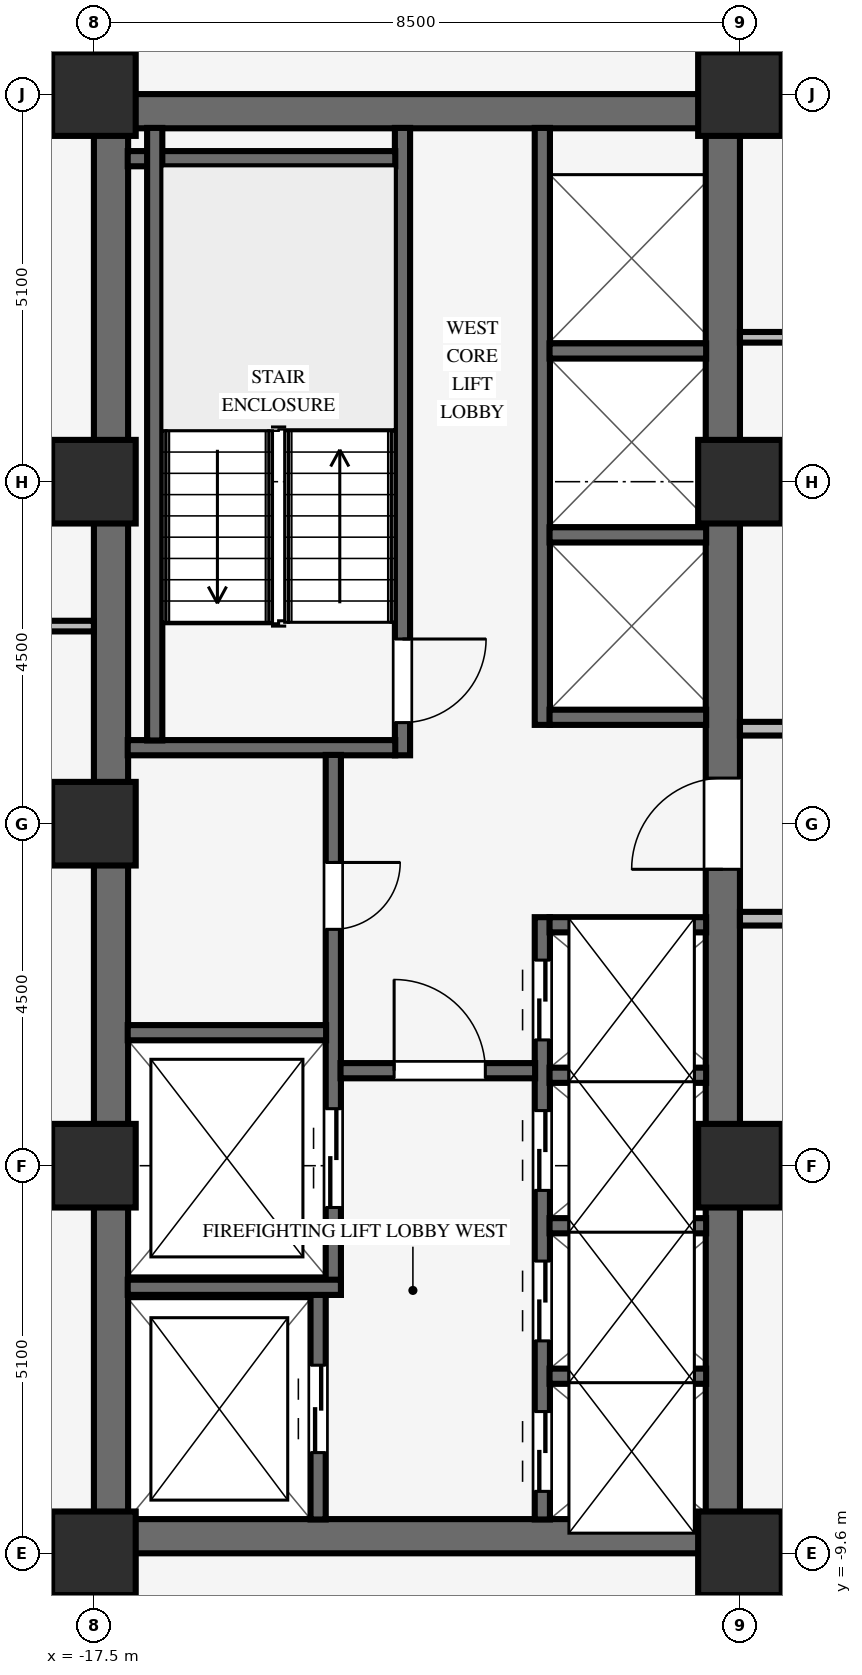
"""IFC4 building model, lengths in metres.
Left out: names, types, materials, properties, quantities, classifications, styles, units other than length and angle.
Written with IfcOpenShell. Run it as: python <this file> out.ifc"""

import sys

from ifc_helpers import new_model, si_unit, direction, frame, frame_2d, origin, origin_2d, place, context, subcontext, project, spatial, rectangle, extrude, source, transform, mapped, element, fill, save


model = new_model("IFC4")
c1 = context("Model", 3, precision=1e-05, world=origin(), true_north=direction((0.0, 1.0)))
c2 = subcontext(c1, "Body", "Model", "MODEL_VIEW")
j1 = project(units=[si_unit("LENGTHUNIT", "METRE"), si_unit("PLANEANGLEUNIT", "RADIAN")], contexts=[c1])
p1 = place(None, origin())
s1 = spatial("IfcSite", under=j1, at=p1, CompositionType="ELEMENT")
p2 = place(p1, origin())
s2 = spatial("IfcBuilding", under=s1, at=p2, CompositionType="ELEMENT")
p3 = place(p2, frame((0.0, 0.0, 60.45)))
s3 = spatial("IfcBuildingStorey", under=s2, at=p3, CompositionType="ELEMENT", Elevation=60.45)
for number, where, z_axis, x_axis in (
    (1, (-17.5, -9.375, 0.0), (0.0, 0.0, 1.0), (1.0, 0.0, 0.0)),
    (2, (-17.5, 9.375, 0.0), (0.0, 0.0, 1.0), (1.0, 0.0, 0.0)),
):
    element("IfcWall", number, at=place(p3, frame(where, z_axis=z_axis, x_axis=x_axis)), inside=s3, PredefinedType="SHEAR", context=c2, shape_type="SweptSolid", body=[
        extrude(rectangle(XDim=8.5, YDim=0.45, at=frame_2d((4.25, 0.0))), origin(), (0.0, 0.0, 1.0), 3.37),
    ])
p4 = place(p3, frame((-17.275, -9.155, 0.0), z_axis=(0.0, 0.0, 1.0), x_axis=(0.0, 1.0, 0.0)))
e3 = element("IfcWall", 3, at=p4, inside=s3, PredefinedType="SHEAR", context=c2, shape_type="SweptSolid", body=[
    extrude(rectangle(XDim=18.31, YDim=0.45, at=frame_2d((9.155, 0.0))), origin(), (0.0, 0.0, 1.0), 3.37),
])
p5 = place(p3, frame((-9.225, -9.155, 0.0), z_axis=(0.0, 0.0, 1.0), x_axis=(0.0, 1.0, 0.0)))
e4 = element("IfcWall", 4, at=p5, inside=s3, PredefinedType="SHEAR", context=c2, shape_type="SweptSolid", body=[
    extrude(rectangle(XDim=18.31, YDim=0.45, at=frame_2d((9.155, 0.0))), origin(), (0.0, 0.0, 1.0), 3.37),
])
p6 = place(p5, frame((8.555, 0.0, 0.0)))
e5 = element("IfcOpeningElement", 5, at=p6, cuts=e4, PredefinedType="OPENING", context=c2, shape_type="SweptSolid", body=[
    extrude(rectangle(XDim=1.2, YDim=2.15, at=frame_2d((0.6, 1.075))), frame((0.0, 0.235, 0.0), z_axis=(0.0, -1.0, 0.0), x_axis=(1.0, 0.0, 0.0)), (0.0, 0.0, 1.0), 0.47),
])
for number, where, z_axis, x_axis in (
    (6, (-17.5, -9.6, 0.0), (0.0, 0.0, 1.0), (1.0, 0.0, 0.0)),
    (7, (-17.5, -4.5, 0.0), (0.0, 0.0, 1.0), (1.0, 0.0, 0.0)),
    (8, (-17.5, 4.5, 0.0), (0.0, 0.0, 1.0), (1.0, 0.0, 0.0)),
    (9, (-17.5, 9.6, 0.0), (0.0, 0.0, 1.0), (1.0, 0.0, 0.0)),
    (10, (-9.0, -9.6, 0.0), (0.0, 0.0, 1.0), (1.0, 0.0, 0.0)),
    (11, (-9.0, -4.5, 0.0), (0.0, 0.0, 1.0), (1.0, 0.0, 0.0)),
    (12, (-9.0, 4.5, 0.0), (0.0, 0.0, 1.0), (1.0, 0.0, 0.0)),
    (13, (-9.0, 9.6, 0.0), (0.0, 0.0, 1.0), (1.0, 0.0, 0.0)),
    (14, (-17.5, 0.0, 0.0), (0.0, 0.0, 1.0), (1.0, 0.0, 0.0)),
):
    element("IfcColumn", number, at=place(p3, frame(where, z_axis=z_axis, x_axis=x_axis)), inside=s3, PredefinedType="COLUMN", context=c2, shape_type="SweptSolid", body=[
        extrude(rectangle(XDim=1.1, YDim=1.1, at=origin_2d()), origin(), (0.0, 0.0, 1.0), 3.37),
    ])
p7 = place(p3, frame((-13.44, 0.9, 0.0), z_axis=(0.0, 0.0, 1.0), x_axis=(0.0, 1.0, 0.0)))
e15 = element("IfcWall", 15, at=p7, inside=s3, PredefinedType="SHEAR", context=c2, shape_type="SweptSolid", body=[
    extrude(rectangle(XDim=8.255, YDim=0.2, at=frame_2d((4.127, 0.0))), origin(), (0.0, 0.0, 1.0), 3.37),
])
p8 = place(p7, frame((1.53, 0.0, 0.0), z_axis=(0.0, 0.0, 1.0), x_axis=(-1.0, 0.0, 0.0)))
e16 = element("IfcOpeningElement", 16, at=p8, cuts=e15, PredefinedType="OPENING", context=c2, shape_type="SweptSolid", body=[
    extrude(rectangle(XDim=1.1, YDim=2.15, at=frame_2d((0.55, 1.075))), frame((0.0, 0.11, 0.0), z_axis=(0.0, -1.0, 0.0), x_axis=(1.0, 0.0, 0.0)), (0.0, 0.0, 1.0), 0.22),
])
for number, where, z_axis, x_axis in (
    (17, (-17.055, 1.0, 0.0), (0.0, 0.0, 1.0), (1.0, 0.0, 0.0)),
    (18, (-17.055, 8.75, 0.0), (0.0, 0.0, 1.0), (1.0, 0.0, 0.0)),
):
    element("IfcWall", number, at=place(p3, frame(where, z_axis=z_axis, x_axis=x_axis)), inside=s3, PredefinedType="SHEAR", context=c2, shape_type="SweptSolid", body=[
        extrude(rectangle(XDim=3.52, YDim=0.2, at=frame_2d((1.76, 0.0))), origin(), (0.0, 0.0, 1.0), 3.37),
    ])
p9 = place(p3, frame((-16.7, 1.095, 0.0), z_axis=(0.0, 0.0, 1.0), x_axis=(0.0, 1.0, 0.0)))
e19 = element("IfcWall", 19, at=p9, inside=s3, PredefinedType="SHEAR", context=c2, shape_type="SweptSolid", body=[
    extrude(rectangle(XDim=8.06, YDim=0.2, at=frame_2d((4.03, 0.0))), origin(), (0.0, 0.0, 1.0), 3.37),
])
p10 = place(p3, frame((-14.55, -9.155, 0.0), z_axis=(0.0, 0.0, 1.0), x_axis=(0.0, 1.0, 0.0)))
e20 = element("IfcWall", 20, at=p10, inside=s3, PredefinedType="SHEAR", context=c2, shape_type="SweptSolid", body=[
    extrude(rectangle(XDim=2.96, YDim=0.2, at=frame_2d((1.48, 0.0))), origin(), (0.0, 0.0, 1.0), 3.37),
])
p11 = place(p10, frame((0.88, 0.0, 0.0)))
e21 = element("IfcOpeningElement", 21, at=p11, cuts=e20, PredefinedType="OPENING", context=c2, shape_type="SweptSolid", body=[
    extrude(rectangle(XDim=1.15, YDim=2.15, at=frame_2d((0.575, 1.075))), frame((0.0, 0.11, 0.0), z_axis=(0.0, -1.0, 0.0), x_axis=(1.0, 0.0, 0.0)), (0.0, 0.0, 1.0), 0.22),
])
p12 = place(p3, frame((-14.35, -6.2, 0.0), z_axis=(0.0, 0.0, 1.0), x_axis=(0.0, 1.0, 0.0)))
e22 = element("IfcWall", 22, at=p12, inside=s3, PredefinedType="SHEAR", context=c2, shape_type="SweptSolid", body=[
    extrude(rectangle(XDim=7.105, YDim=0.2, at=frame_2d((3.552, 0.0))), origin(), (0.0, 0.0, 1.0), 3.37),
])
p13 = place(p12, frame((5.69, 0.0, 0.0), z_axis=(0.0, 0.0, 1.0), x_axis=(-1.0, 0.0, 0.0)))
e23 = element("IfcOpeningElement", 23, at=p13, cuts=e22, PredefinedType="OPENING", context=c2, shape_type="SweptSolid", body=[
    extrude(rectangle(XDim=0.88, YDim=2.1, at=frame_2d((0.44, 1.05))), frame((0.0, 0.11, 0.0), z_axis=(0.0, -1.0, 0.0), x_axis=(1.0, 0.0, 0.0)), (0.0, 0.0, 1.0), 0.22),
])
p14 = place(p12, frame((1.15, 0.0, 0.0)))
e24 = element("IfcOpeningElement", 24, at=p14, cuts=e22, PredefinedType="OPENING", context=c2, shape_type="SweptSolid", body=[
    extrude(rectangle(XDim=1.3, YDim=2.2, at=frame_2d((0.65, 1.1))), frame((0.0, 0.11, 0.0), z_axis=(0.0, -1.0, 0.0), x_axis=(1.0, 0.0, 0.0)), (0.0, 0.0, 1.0), 0.22),
])
p15 = place(p3, frame((-17.055, -6.1, 0.0), z_axis=(0.0, 0.0, 1.0), x_axis=(1.0, 0.0, 0.0)))
e25 = element("IfcWall", 25, at=p15, inside=s3, PredefinedType="SHEAR", context=c2, shape_type="SweptSolid", body=[
    extrude(rectangle(XDim=2.805, YDim=0.2, at=frame_2d((1.402, 0.0))), origin(), (0.0, 0.0, 1.0), 3.37),
])
p16 = place(p3, frame((-17.055, -2.75, 0.0), z_axis=(0.0, 0.0, 1.0), x_axis=(1.0, 0.0, 0.0)))
e26 = element("IfcWall", 26, at=p16, inside=s3, PredefinedType="SHEAR", context=c2, shape_type="SweptSolid", body=[
    extrude(rectangle(XDim=2.61, YDim=0.2, at=frame_2d((1.305, 0.0))), origin(), (0.0, 0.0, 1.0), 3.37),
])
p17 = place(p3, frame((-11.6, -9.155, 0.0), z_axis=(0.0, 0.0, 1.0), x_axis=(0.0, 1.0, 0.0)))
e27 = element("IfcWall", 27, at=p17, inside=s3, PredefinedType="SHEAR", context=c2, shape_type="SweptSolid", body=[
    extrude(rectangle(XDim=7.925, YDim=0.2, at=frame_2d((3.962, 0.0))), origin(), (0.0, 0.0, 1.0), 3.37),
])
p18 = place(p17, frame((0.37, 0.0, 0.0)))
e28 = element("IfcOpeningElement", 28, at=p18, cuts=e27, PredefinedType="OPENING", context=c2, shape_type="SweptSolid", body=[
    extrude(rectangle(XDim=1.05, YDim=2.15, at=frame_2d((0.525, 1.075))), frame((0.0, 0.11, 0.0), z_axis=(0.0, -1.0, 0.0), x_axis=(1.0, 0.0, 0.0)), (0.0, 0.0, 1.0), 0.22),
])
p19 = place(p17, frame((2.35, 0.0, 0.0)))
e29 = element("IfcOpeningElement", 29, at=p19, cuts=e27, PredefinedType="OPENING", context=c2, shape_type="SweptSolid", body=[
    extrude(rectangle(XDim=1.05, YDim=2.15, at=frame_2d((0.525, 1.075))), frame((0.0, 0.11, 0.0), z_axis=(0.0, -1.0, 0.0), x_axis=(1.0, 0.0, 0.0)), (0.0, 0.0, 1.0), 0.22),
])
p20 = place(p17, frame((4.33, 0.0, 0.0)))
e30 = element("IfcOpeningElement", 30, at=p20, cuts=e27, PredefinedType="OPENING", context=c2, shape_type="SweptSolid", body=[
    extrude(rectangle(XDim=1.05, YDim=2.15, at=frame_2d((0.525, 1.075))), frame((0.0, 0.11, 0.0), z_axis=(0.0, -1.0, 0.0), x_axis=(1.0, 0.0, 0.0)), (0.0, 0.0, 1.0), 0.22),
])
p21 = place(p17, frame((6.31, 0.0, 0.0)))
e31 = element("IfcOpeningElement", 31, at=p21, cuts=e27, PredefinedType="OPENING", context=c2, shape_type="SweptSolid", body=[
    extrude(rectangle(XDim=1.05, YDim=2.15, at=frame_2d((0.525, 1.075))), frame((0.0, 0.11, 0.0), z_axis=(0.0, -1.0, 0.0), x_axis=(1.0, 0.0, 0.0)), (0.0, 0.0, 1.0), 0.22),
])
p22 = place(p3, frame((-14.255, -3.25, 0.0), z_axis=(0.0, 0.0, 1.0), x_axis=(1.0, 0.0, 0.0)))
e32 = element("IfcWall", 32, at=p22, inside=s3, PredefinedType="SHEAR", context=c2, shape_type="SweptSolid", body=[
    extrude(rectangle(XDim=2.56, YDim=0.2, at=frame_2d((1.28, 0.0))), origin(), (0.0, 0.0, 1.0), 3.37),
])
p23 = place(p22, frame((0.705, 0.0, 0.0)))
e33 = element("IfcOpeningElement", 33, at=p23, cuts=e32, PredefinedType="OPENING", context=c2, shape_type="SweptSolid", body=[
    extrude(rectangle(XDim=1.2, YDim=2.15, at=frame_2d((0.6, 1.075))), frame((0.0, 0.11, 0.0), z_axis=(0.0, -1.0, 0.0), x_axis=(1.0, 0.0, 0.0)), (0.0, 0.0, 1.0), 0.22),
])
for number, where, z_axis, x_axis in (
    (34, (-11.505, -7.27, 0.0), (0.0, 0.0, 1.0), (1.0, 0.0, 0.0)),
    (35, (-11.505, -5.29, 0.0), (0.0, 0.0, 1.0), (1.0, 0.0, 0.0)),
    (36, (-11.505, -3.31, 0.0), (0.0, 0.0, 1.0), (1.0, 0.0, 0.0)),
    (37, (-11.505, -1.33, 0.0), (0.0, 0.0, 1.0), (1.0, 0.0, 0.0)),
):
    element("IfcWall", number, at=place(p3, frame(where, z_axis=z_axis, x_axis=x_axis)), inside=s3, PredefinedType="SHEAR", context=c2, shape_type="SweptSolid", body=[
        extrude(rectangle(XDim=2.06, YDim=0.2, at=frame_2d((1.03, 0.0))), origin(), (0.0, 0.0, 1.0), 3.37),
    ])
p24 = place(p3, frame((-11.6, 1.3, 0.0), z_axis=(0.0, 0.0, 1.0), x_axis=(0.0, 1.0, 0.0)))
e38 = element("IfcWall", 38, at=p24, inside=s3, PredefinedType="SHEAR", context=c2, shape_type="SweptSolid", body=[
    extrude(rectangle(XDim=7.855, YDim=0.2, at=frame_2d((3.927, 0.0))), origin(), (0.0, 0.0, 1.0), 3.37),
])
for number, where, z_axis, x_axis in (
    (39, (-11.505, 1.4, 0.0), (0.0, 0.0, 1.0), (1.0, 0.0, 0.0)),
    (40, (-11.505, 3.8, 0.0), (0.0, 0.0, 1.0), (1.0, 0.0, 0.0)),
    (41, (-11.505, 6.22, 0.0), (0.0, 0.0, 1.0), (1.0, 0.0, 0.0)),
):
    element("IfcWall", number, at=place(p3, frame(where, z_axis=z_axis, x_axis=x_axis)), inside=s3, PredefinedType="SHEAR", context=c2, shape_type="SweptSolid", body=[
        extrude(rectangle(XDim=2.06, YDim=0.2, at=frame_2d((1.03, 0.0))), origin(), (0.0, 0.0, 1.0), 3.37),
    ])
p25 = place(p3, frame((-8.454, -9.6, 0.0), z_axis=(0.0, 0.0, 1.0), x_axis=(1.0, 0.0, 0.0)))
e42 = element("IfcWall", 42, at=p25, inside=s3, PredefinedType="PARTITIONING", context=c2, shape_type="SweptSolid", body=[
    extrude(rectangle(XDim=5.254, YDim=0.18, at=frame_2d((2.627, 0.0))), origin(), (0.0, 0.0, 1.0), 2.405),
])
p26 = place(p3, frame((-9.0, -1.25, 0.0), z_axis=(0.0, 0.0, 1.0), x_axis=(1.0, 0.0, 0.0)))
e43 = element("IfcWall", 43, at=p26, inside=s3, PredefinedType="PARTITIONING", context=c2, shape_type="SweptSolid", body=[
    extrude(rectangle(XDim=5.8, YDim=0.18, at=frame_2d((2.9, 0.0))), origin(), (0.0, 0.0, 1.0), 3.36),
])
p27 = place(p3, frame((-9.0, 1.25, 0.0), z_axis=(0.0, 0.0, 1.0), x_axis=(1.0, 0.0, 0.0)))
e44 = element("IfcWall", 44, at=p27, inside=s3, PredefinedType="PARTITIONING", context=c2, shape_type="SweptSolid", body=[
    extrude(rectangle(XDim=5.8, YDim=0.18, at=frame_2d((2.9, 0.0))), origin(), (0.0, 0.0, 1.0), 3.36),
])
p28 = place(p27, frame((2.42, 0.0, 0.0)))
e45 = element("IfcOpeningElement", 45, at=p28, cuts=e44, PredefinedType="OPENING", context=c2, shape_type="SweptSolid", body=[
    extrude(rectangle(XDim=0.96, YDim=2.1, at=frame_2d((0.48, 1.05))), frame((0.0, 0.1, 0.0), z_axis=(0.0, -1.0, 0.0), x_axis=(1.0, 0.0, 0.0)), (0.0, 0.0, 1.0), 0.2),
])
p29 = place(p3, frame((-21.16, 2.6, 0.0), z_axis=(0.0, 0.0, 1.0), x_axis=(1.0, 0.0, 0.0)))
e46 = element("IfcWall", 46, at=p29, inside=s3, PredefinedType="PARTITIONING", context=c2, shape_type="SweptSolid", body=[
    extrude(rectangle(XDim=3.66, YDim=0.14, at=frame_2d((1.83, 0.0))), origin(), (0.0, 0.0, 1.0), 3.36),
])
p30 = place(p3, frame((-9.0, 6.4, 0.0), z_axis=(0.0, 0.0, 1.0), x_axis=(1.0, 0.0, 0.0)))
e47 = element("IfcWall", 47, at=p30, inside=s3, PredefinedType="PARTITIONING", context=c2, shape_type="SweptSolid", body=[
    extrude(rectangle(XDim=5.714, YDim=0.14, at=frame_2d((2.857, 0.0))), origin(), (0.0, 0.0, 1.0), 3.36),
])
p31 = place(p3, frame((-8.454, 9.6, 0.0), z_axis=(0.0, 0.0, 1.0), x_axis=(1.0, 0.0, 0.0)))
e48 = element("IfcWall", 48, at=p31, inside=s3, PredefinedType="PARTITIONING", context=c2, shape_type="SweptSolid", body=[
    extrude(rectangle(XDim=5.254, YDim=0.18, at=frame_2d((2.627, 0.0))), origin(), (0.0, 0.0, 1.0), 2.405),
])
p32 = place(p31, frame((2.147, 0.0, 0.0)))
e49 = element("IfcOpeningElement", 49, at=p32, cuts=e48, PredefinedType="OPENING", context=c2, shape_type="SweptSolid", body=[
    extrude(rectangle(XDim=0.96, YDim=2.1, at=frame_2d((0.48, 1.05))), frame((0.0, 0.1, 0.0), z_axis=(0.0, -1.0, 0.0), x_axis=(1.0, 0.0, 0.0)), (0.0, 0.0, 1.0), 0.2),
])
for number, where, z_axis, x_axis in (
    (50, (-17.5, -11.114, 0.0), (0.0, 0.0, 1.0), (0.0, 1.0, 0.0)),
    (51, (-17.5, 10.146, 0.0), (0.0, 0.0, 1.0), (0.0, 1.0, 0.0)),
):
    element("IfcWall", number, at=place(p3, frame(where, z_axis=z_axis, x_axis=x_axis)), inside=s3, PredefinedType="PARTITIONING", context=c2, shape_type="SweptSolid", body=[
        extrude(rectangle(XDim=0.968, YDim=0.18, at=frame_2d((0.484, 0.0))), origin(), (0.0, 0.0, 1.0), 2.738),
    ])
m1 = source(origin(), c2, "Body", "SweptSolid", [
    extrude(rectangle(XDim=1.1, YDim=2.15, at=frame_2d((0.55, 1.075))), frame((0.0, 0.025, 0.0), z_axis=(0.0, -1.0, 0.0), x_axis=(1.0, 0.0, 0.0)), (0.0, 0.0, 1.0), 0.05),
])
p33 = place(p8, origin())
e52 = element("IfcDoor", 52, at=p33, inside=s3, OperationType="SINGLE_SWING_LEFT", PredefinedType="DOOR", context=c2, shape_type="MappedRepresentation", body=[
    mapped(m1, transform((0.0, 0.0, 0.0), scale=1.0)),
])
fill(e16, e52)
m2 = source(origin(), c2, "Body", "SweptSolid", [
    extrude(rectangle(XDim=0.88, YDim=2.1, at=frame_2d((0.44, 1.05))), frame((0.0, 0.025, 0.0), z_axis=(0.0, -1.0, 0.0), x_axis=(1.0, 0.0, 0.0)), (0.0, 0.0, 1.0), 0.05),
])
p34 = place(p13, origin())
e53 = element("IfcDoor", 53, at=p34, inside=s3, OperationType="SINGLE_SWING_LEFT", PredefinedType="DOOR", context=c2, shape_type="MappedRepresentation", body=[
    mapped(m2, transform((0.0, 0.0, 0.0), scale=1.0)),
])
fill(e23, e53)
m3 = source(origin(), c2, "Body", "SweptSolid", [
    extrude(rectangle(XDim=1.2, YDim=2.15, at=frame_2d((0.6, 1.075))), frame((0.0, 0.025, 0.0), z_axis=(0.0, -1.0, 0.0), x_axis=(1.0, 0.0, 0.0)), (0.0, 0.0, 1.0), 0.05),
])
p35 = place(p23, origin())
e54 = element("IfcDoor", 54, at=p35, inside=s3, OperationType="SINGLE_SWING_LEFT", PredefinedType="DOOR", context=c2, shape_type="MappedRepresentation", body=[
    mapped(m3, transform((0.0, 0.0, 0.0), scale=1.0)),
])
fill(e33, e54)
p36 = place(p6, origin())
e55 = element("IfcDoor", 55, at=p36, inside=s3, OperationType="SINGLE_SWING_LEFT", PredefinedType="DOOR", context=c2, shape_type="MappedRepresentation", body=[
    mapped(m3, transform((0.0, 0.0, 0.0), scale=1.0)),
])
fill(e5, e55)
m4 = source(origin(), c2, "Body", "SweptSolid", [
    extrude(rectangle(XDim=1.15, YDim=2.15, at=frame_2d((0.575, 1.075))), frame((0.0, 0.025, 0.0), z_axis=(0.0, -1.0, 0.0), x_axis=(1.0, 0.0, 0.0)), (0.0, 0.0, 1.0), 0.05),
])
p37 = place(p11, origin())
e56 = element("IfcDoor", 56, at=p37, inside=s3, OperationType="DOUBLE_DOOR_SLIDING", PredefinedType="DOOR", context=c2, shape_type="MappedRepresentation", body=[
    mapped(m4, transform((0.0, 0.0, 0.0), scale=1.0)),
])
fill(e21, e56)
m5 = source(origin(), c2, "Body", "SweptSolid", [
    extrude(rectangle(XDim=1.3, YDim=2.2, at=frame_2d((0.65, 1.1))), frame((0.0, 0.025, 0.0), z_axis=(0.0, -1.0, 0.0), x_axis=(1.0, 0.0, 0.0)), (0.0, 0.0, 1.0), 0.05),
])
p38 = place(p14, origin())
e57 = element("IfcDoor", 57, at=p38, inside=s3, OperationType="DOUBLE_DOOR_SLIDING", PredefinedType="DOOR", context=c2, shape_type="MappedRepresentation", body=[
    mapped(m5, transform((0.0, 0.0, 0.0), scale=1.0)),
])
fill(e24, e57)
m6 = source(origin(), c2, "Body", "SweptSolid", [
    extrude(rectangle(XDim=1.05, YDim=2.15, at=frame_2d((0.525, 1.075))), frame((0.0, 0.025, 0.0), z_axis=(0.0, -1.0, 0.0), x_axis=(1.0, 0.0, 0.0)), (0.0, 0.0, 1.0), 0.05),
])
p39 = place(p18, origin())
e58 = element("IfcDoor", 58, at=p39, inside=s3, OperationType="DOUBLE_DOOR_SLIDING", PredefinedType="DOOR", context=c2, shape_type="MappedRepresentation", body=[
    mapped(m6, transform((0.0, 0.0, 0.0), scale=1.0)),
])
fill(e28, e58)
p40 = place(p19, origin())
e59 = element("IfcDoor", 59, at=p40, inside=s3, OperationType="DOUBLE_DOOR_SLIDING", PredefinedType="DOOR", context=c2, shape_type="MappedRepresentation", body=[
    mapped(m6, transform((0.0, 0.0, 0.0), scale=1.0)),
])
fill(e29, e59)
p41 = place(p20, origin())
e60 = element("IfcDoor", 60, at=p41, inside=s3, OperationType="DOUBLE_DOOR_SLIDING", PredefinedType="DOOR", context=c2, shape_type="MappedRepresentation", body=[
    mapped(m6, transform((0.0, 0.0, 0.0), scale=1.0)),
])
fill(e30, e60)
p42 = place(p21, origin())
e61 = element("IfcDoor", 61, at=p42, inside=s3, OperationType="DOUBLE_DOOR_SLIDING", PredefinedType="DOOR", context=c2, shape_type="MappedRepresentation", body=[
    mapped(m6, transform((0.0, 0.0, 0.0), scale=1.0)),
])
fill(e31, e61)
save(model, sys.argv[1])
